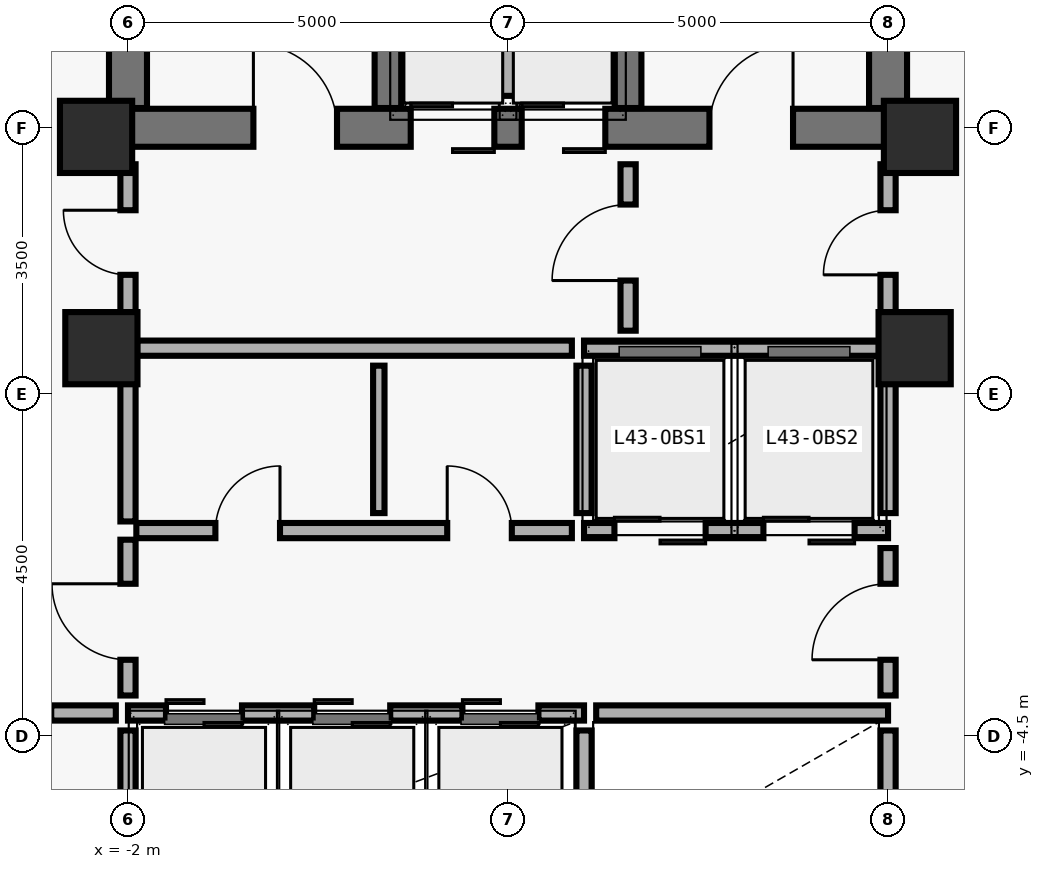
"""IFC4 building model, lengths in metres.
Left out: names, types, materials, properties, quantities, classifications, styles, units other than length and angle.
Written with IfcOpenShell. Run it as: python <this file> out.ifc"""

import sys

from ifc_helpers import new_model, si_unit, direction, frame, frame_2d, origin, origin_2d, place, context, subcontext, project, spatial, rectangle, extrude, element, fill, save


model = new_model("IFC4")
c1 = context("Model", 3, precision=1e-05, world=origin(), true_north=direction((0.0, 1.0)))
c2 = subcontext(c1, "Body", "Model", "MODEL_VIEW")
j1 = project(units=[si_unit("LENGTHUNIT", "METRE"), si_unit("PLANEANGLEUNIT", "RADIAN")], contexts=[c1])
p1 = place(None, origin())
s1 = spatial("IfcSite", under=j1, at=p1, CompositionType="ELEMENT")
p2 = place(p1, origin())
s2 = spatial("IfcBuilding", under=s1, at=p2, CompositionType="ELEMENT")
p3 = place(p2, frame((0.0, 0.0, 173.4)))
s3 = spatial("IfcBuildingStorey", under=s2, at=p3, CompositionType="ELEMENT", Elevation=173.4)
p4 = place(p3, frame((-2.0, 3.5, 0.0), z_axis=(0.0, 0.0, 1.0), x_axis=(1.0, 0.0, 0.0)))
e1 = element("IfcWall", 1, at=p4, inside=s3, PredefinedType="SHEAR", context=c2, shape_type="SweptSolid", body=[
    extrude(rectangle(XDim=10.0, YDim=0.5, at=frame_2d((5.0, 0.0))), origin(), (0.0, 0.0, 1.0), 5.392),
])
p5 = place(p4, frame((1.65, 0.0, 0.0)))
e2 = element("IfcOpeningElement", 2, at=p5, cuts=e1, PredefinedType="OPENING", context=c2, shape_type="SweptSolid", body=[
    extrude(rectangle(XDim=1.1, YDim=2.15, at=frame_2d((0.55, 1.075))), frame((0.0, 0.26, 0.0), z_axis=(0.0, -1.0, 0.0), x_axis=(1.0, 0.0, 0.0)), (0.0, 0.0, 1.0), 0.52),
])
p6 = place(p4, frame((7.65, 0.0, 0.0)))
e3 = element("IfcOpeningElement", 3, at=p6, cuts=e1, PredefinedType="OPENING", context=c2, shape_type="SweptSolid", body=[
    extrude(rectangle(XDim=1.1, YDim=2.15, at=frame_2d((0.55, 1.075))), frame((0.0, 0.26, 0.0), z_axis=(0.0, -1.0, 0.0), x_axis=(1.0, 0.0, 0.0)), (0.0, 0.0, 1.0), 0.52),
])
p7 = place(p4, frame((3.72, 0.0, 0.0)))
e4 = element("IfcOpeningElement", 4, at=p7, cuts=e1, PredefinedType="OPENING", context=c2, shape_type="SweptSolid", body=[
    extrude(rectangle(XDim=1.1, YDim=2.2, at=frame_2d((0.55, 1.1))), frame((0.0, 0.26, 0.0), z_axis=(0.0, -1.0, 0.0), x_axis=(1.0, 0.0, 0.0)), (0.0, 0.0, 1.0), 0.52),
])
p8 = place(p4, frame((5.18, 0.0, 0.0)))
e5 = element("IfcOpeningElement", 5, at=p8, cuts=e1, PredefinedType="OPENING", context=c2, shape_type="SweptSolid", body=[
    extrude(rectangle(XDim=1.1, YDim=2.2, at=frame_2d((0.55, 1.1))), frame((0.0, 0.26, 0.0), z_axis=(0.0, -1.0, 0.0), x_axis=(1.0, 0.0, 0.0)), (0.0, 0.0, 1.0), 0.52),
])
for number, where, z_axis, x_axis in (
    (6, (-2.0, 3.76, 0.0), (0.0, 0.0, 1.0), (0.0, 1.0, 0.0)),
    (7, (8.0, 3.76, 0.0), (0.0, 0.0, 1.0), (0.0, 1.0, 0.0)),
):
    element("IfcWall", number, at=place(p3, frame(where, z_axis=z_axis, x_axis=x_axis)), inside=s3, PredefinedType="SHEAR", context=c2, shape_type="SweptSolid", body=[
        extrude(rectangle(XDim=8.48, YDim=0.5, at=frame_2d((4.24, 0.0))), origin(), (0.0, 0.0, 1.0), 5.392),
    ])
for number, where, z_axis, x_axis in (
    (8, (1.42, 3.76, 0.0), (0.0, 0.0, 1.0), (0.0, 1.0, 0.0)),
    (9, (4.58, 3.76, 0.0), (0.0, 0.0, 1.0), (0.0, 1.0, 0.0)),
):
    element("IfcWall", number, at=place(p3, frame(where, z_axis=z_axis, x_axis=x_axis)), inside=s3, PredefinedType="SHEAR", context=c2, shape_type="SweptSolid", body=[
        extrude(rectangle(XDim=8.48, YDim=0.35, at=frame_2d((4.24, 0.0))), origin(), (0.0, 0.0, 1.0), 5.392),
    ])
for number, where, z_axis, x_axis in (
    (10, (-2.42, 3.38, 0.0), (0.0, 0.0, 1.0), (1.0, 0.0, 0.0)),
    (11, (8.42, 3.38, 0.0), (0.0, 0.0, 1.0), (1.0, 0.0, 0.0)),
    (12, (-2.35, 0.6, 0.0), (0.0, 0.0, 1.0), (1.0, 0.0, 0.0)),
    (13, (8.35, 0.6, 0.0), (0.0, 0.0, 1.0), (1.0, 0.0, 0.0)),
):
    element("IfcColumn", number, at=place(p3, frame(where, z_axis=z_axis, x_axis=x_axis)), inside=s3, PredefinedType="COLUMN", context=c2, shape_type="SweptSolid", body=[
        extrude(rectangle(XDim=0.95, YDim=0.95, at=origin_2d()), origin(), (0.0, 0.0, 1.0), 5.375),
    ])
p9 = place(p3, frame((3.0, 3.92, 0.0), z_axis=(0.0, 0.0, 1.0), x_axis=(0.0, 1.0, 0.0)))
e14 = element("IfcWall", 14, at=p9, inside=s3, PredefinedType="SOLIDWALL", context=c2, shape_type="SweptSolid", body=[
    extrude(rectangle(XDim=2.03, YDim=0.2, at=frame_2d((1.015, 0.0))), origin(), (0.0, 0.0, 1.0), 4.95),
])
p10 = place(p3, frame((4.0, 0.6, 0.0), z_axis=(0.0, 0.0, 1.0), x_axis=(1.0, 0.0, 0.0)))
e15 = element("IfcWall", 15, at=p10, inside=s3, PredefinedType="SOLIDWALL", context=c2, shape_type="SweptSolid", body=[
    extrude(rectangle(XDim=3.88, YDim=0.2, at=frame_2d((1.94, 0.0))), origin(), (0.0, 0.0, 1.0), 3.432),
])
p11 = place(p3, frame((4.0, -1.8, 0.0), z_axis=(0.0, 0.0, 1.0), x_axis=(1.0, 0.0, 0.0)))
e16 = element("IfcWall", 16, at=p11, inside=s3, PredefinedType="SOLIDWALL", context=c2, shape_type="SweptSolid", body=[
    extrude(rectangle(XDim=4.0, YDim=0.2, at=frame_2d((2.0, 0.0))), origin(), (0.0, 0.0, 1.0), 4.95),
])
p12 = place(p11, frame((0.4, 0.0, 0.0)))
e17 = element("IfcOpeningElement", 17, at=p12, cuts=e16, PredefinedType="OPENING", context=c2, shape_type="SweptSolid", body=[
    extrude(rectangle(XDim=1.2, YDim=2.25, at=frame_2d((0.6, 1.125))), frame((0.0, 0.11, 0.0), z_axis=(0.0, -1.0, 0.0), x_axis=(1.0, 0.0, 0.0)), (0.0, 0.0, 1.0), 0.22),
])
p13 = place(p11, frame((2.36, 0.0, 0.0)))
e18 = element("IfcOpeningElement", 18, at=p13, cuts=e16, PredefinedType="OPENING", context=c2, shape_type="SweptSolid", body=[
    extrude(rectangle(XDim=1.2, YDim=2.25, at=frame_2d((0.6, 1.125))), frame((0.0, 0.11, 0.0), z_axis=(0.0, -1.0, 0.0), x_axis=(1.0, 0.0, 0.0)), (0.0, 0.0, 1.0), 0.22),
])
p14 = place(p3, frame((4.0, -1.57, 0.0), z_axis=(0.0, 0.0, 1.0), x_axis=(0.0, 1.0, 0.0)))
e19 = element("IfcWall", 19, at=p14, inside=s3, PredefinedType="SOLIDWALL", context=c2, shape_type="SweptSolid", body=[
    extrude(rectangle(XDim=1.94, YDim=0.2, at=frame_2d((0.97, 0.0))), origin(), (0.0, 0.0, 1.0), 4.95),
])
p15 = place(p3, frame((8.0, -1.57, 0.0), z_axis=(0.0, 0.0, 1.0), x_axis=(0.0, 1.0, 0.0)))
e20 = element("IfcWall", 20, at=p15, inside=s3, PredefinedType="SOLIDWALL", context=c2, shape_type="SweptSolid", body=[
    extrude(rectangle(XDim=2.05, YDim=0.2, at=frame_2d((1.025, 0.0))), origin(), (0.0, 0.0, 1.0), 3.432),
])
p16 = place(p3, frame((-2.0, -4.2, 0.0), z_axis=(0.0, 0.0, 1.0), x_axis=(1.0, 0.0, 0.0)))
e21 = element("IfcWall", 21, at=p16, inside=s3, PredefinedType="SOLIDWALL", context=c2, shape_type="SweptSolid", body=[
    extrude(rectangle(XDim=6.0, YDim=0.2, at=frame_2d((3.0, 0.0))), origin(), (0.0, 0.0, 1.0), 4.95),
])
p17 = place(p16, frame((0.5, 0.0, 0.0)))
e22 = element("IfcOpeningElement", 22, at=p17, cuts=e21, PredefinedType="OPENING", context=c2, shape_type="SweptSolid", body=[
    extrude(rectangle(XDim=1.0, YDim=2.2, at=frame_2d((0.5, 1.1))), frame((0.0, 0.11, 0.0), z_axis=(0.0, -1.0, 0.0), x_axis=(1.0, 0.0, 0.0)), (0.0, 0.0, 1.0), 0.22),
])
p18 = place(p16, frame((2.45, 0.0, 0.0)))
e23 = element("IfcOpeningElement", 23, at=p18, cuts=e21, PredefinedType="OPENING", context=c2, shape_type="SweptSolid", body=[
    extrude(rectangle(XDim=1.0, YDim=2.2, at=frame_2d((0.5, 1.1))), frame((0.0, 0.11, 0.0), z_axis=(0.0, -1.0, 0.0), x_axis=(1.0, 0.0, 0.0)), (0.0, 0.0, 1.0), 0.22),
])
p19 = place(p16, frame((4.4, 0.0, 0.0)))
e24 = element("IfcOpeningElement", 24, at=p19, cuts=e21, PredefinedType="OPENING", context=c2, shape_type="SweptSolid", body=[
    extrude(rectangle(XDim=1.0, YDim=2.2, at=frame_2d((0.5, 1.1))), frame((0.0, 0.11, 0.0), z_axis=(0.0, -1.0, 0.0), x_axis=(1.0, 0.0, 0.0)), (0.0, 0.0, 1.0), 0.22),
])
p20 = place(p3, frame((-2.0, -6.37, 0.0), z_axis=(0.0, 0.0, 1.0), x_axis=(0.0, 1.0, 0.0)))
e25 = element("IfcWall", 25, at=p20, inside=s3, PredefinedType="SOLIDWALL", context=c2, shape_type="SweptSolid", body=[
    extrude(rectangle(XDim=1.94, YDim=0.2, at=frame_2d((0.97, 0.0))), origin(), (0.0, 0.0, 1.0), 3.432),
])
p21 = place(p3, frame((4.16, -4.2, 0.0), z_axis=(0.0, 0.0, 1.0), x_axis=(1.0, 0.0, 0.0)))
e26 = element("IfcWall", 26, at=p21, inside=s3, PredefinedType="SOLIDWALL", context=c2, shape_type="SweptSolid", body=[
    extrude(rectangle(XDim=3.84, YDim=0.2, at=frame_2d((1.92, 0.0))), origin(), (0.0, 0.0, 1.0), 4.95),
])
p22 = place(p3, frame((4.0, -6.37, 0.0), z_axis=(0.0, 0.0, 1.0), x_axis=(0.0, 1.0, 0.0)))
e27 = element("IfcWall", 27, at=p22, inside=s3, PredefinedType="SOLIDWALL", context=c2, shape_type="SweptSolid", body=[
    extrude(rectangle(XDim=1.94, YDim=0.2, at=frame_2d((0.97, 0.0))), origin(), (0.0, 0.0, 1.0), 4.95),
])
p23 = place(p3, frame((8.0, -6.37, 0.0), z_axis=(0.0, 0.0, 1.0), x_axis=(0.0, 1.0, 0.0)))
e28 = element("IfcWall", 28, at=p23, inside=s3, PredefinedType="SOLIDWALL", context=c2, shape_type="SweptSolid", body=[
    extrude(rectangle(XDim=1.94, YDim=0.2, at=frame_2d((0.97, 0.0))), origin(), (0.0, 0.0, 1.0), 3.432),
])
p24 = place(p3, frame((4.58, 0.83, 0.0), z_axis=(0.0, 0.0, 1.0), x_axis=(0.0, 1.0, 0.0)))
e29 = element("IfcWall", 29, at=p24, inside=s3, PredefinedType="MOVABLE", context=c2, shape_type="SweptSolid", body=[
    extrude(rectangle(XDim=2.19, YDim=0.2, at=frame_2d((1.095, 0.0))), origin(), (0.0, 0.0, 1.0), 4.95),
])
p25 = place(p24, frame((0.66, 0.0, 0.0)))
e30 = element("IfcOpeningElement", 30, at=p25, cuts=e29, PredefinedType="OPENING", context=c2, shape_type="SweptSolid", body=[
    extrude(rectangle(XDim=1.0, YDim=2.1, at=frame_2d((0.5, 1.05))), frame((0.0, 0.11, 0.0), z_axis=(0.0, -1.0, 0.0), x_axis=(1.0, 0.0, 0.0)), (0.0, 0.0, 1.0), 0.22),
])
p26 = place(p3, frame((-2.0, 0.72, 0.0), z_axis=(0.0, 0.0, 1.0), x_axis=(0.0, 1.0, 0.0)))
e31 = element("IfcWall", 31, at=p26, inside=s3, PredefinedType="MOVABLE", context=c2, shape_type="SweptSolid", body=[
    extrude(rectangle(XDim=2.3, YDim=0.2, at=frame_2d((1.15, 0.0))), origin(), (0.0, 0.0, 1.0), 3.432),
])
p27 = place(p26, frame((0.845, 0.0, 0.0)))
e32 = element("IfcOpeningElement", 32, at=p27, cuts=e31, PredefinedType="OPENING", context=c2, shape_type="SweptSolid", body=[
    extrude(rectangle(XDim=0.85, YDim=2.1, at=frame_2d((0.425, 1.05))), frame((0.0, 0.11, 0.0), z_axis=(0.0, -1.0, 0.0), x_axis=(1.0, 0.0, 0.0)), (0.0, 0.0, 1.0), 0.22),
])
p28 = place(p3, frame((8.0, 0.72, 0.0), z_axis=(0.0, 0.0, 1.0), x_axis=(0.0, 1.0, 0.0)))
e33 = element("IfcWall", 33, at=p28, inside=s3, PredefinedType="MOVABLE", context=c2, shape_type="SweptSolid", body=[
    extrude(rectangle(XDim=2.3, YDim=0.2, at=frame_2d((1.15, 0.0))), origin(), (0.0, 0.0, 1.0), 3.432),
])
p29 = place(p28, frame((0.845, 0.0, 0.0)))
e34 = element("IfcOpeningElement", 34, at=p29, cuts=e33, PredefinedType="OPENING", context=c2, shape_type="SweptSolid", body=[
    extrude(rectangle(XDim=0.85, YDim=2.1, at=frame_2d((0.425, 1.05))), frame((0.0, 0.11, 0.0), z_axis=(0.0, -1.0, 0.0), x_axis=(1.0, 0.0, 0.0)), (0.0, 0.0, 1.0), 0.22),
])
p30 = place(p3, frame((-2.0, -3.97, 0.0), z_axis=(0.0, 0.0, 1.0), x_axis=(0.0, 1.0, 0.0)))
e35 = element("IfcWall", 35, at=p30, inside=s3, PredefinedType="MOVABLE", context=c2, shape_type="SweptSolid", body=[
    extrude(rectangle(XDim=2.05, YDim=0.2, at=frame_2d((1.025, 0.0))), origin(), (0.0, 0.0, 1.0), 3.432),
])
p31 = place(p30, frame((0.47, 0.0, 0.0)))
e36 = element("IfcOpeningElement", 36, at=p31, cuts=e35, PredefinedType="OPENING", context=c2, shape_type="SweptSolid", body=[
    extrude(rectangle(XDim=1.0, YDim=2.1, at=frame_2d((0.5, 1.05))), frame((0.0, 0.11, 0.0), z_axis=(0.0, -1.0, 0.0), x_axis=(1.0, 0.0, 0.0)), (0.0, 0.0, 1.0), 0.22),
])
p32 = place(p3, frame((8.0, -3.97, 0.0), z_axis=(0.0, 0.0, 1.0), x_axis=(0.0, 1.0, 0.0)))
e37 = element("IfcWall", 37, at=p32, inside=s3, PredefinedType="MOVABLE", context=c2, shape_type="SweptSolid", body=[
    extrude(rectangle(XDim=1.94, YDim=0.2, at=frame_2d((0.97, 0.0))), origin(), (0.0, 0.0, 1.0), 3.432),
])
p33 = place(p32, frame((0.47, 0.0, 0.0)))
e38 = element("IfcOpeningElement", 38, at=p33, cuts=e37, PredefinedType="OPENING", context=c2, shape_type="SweptSolid", body=[
    extrude(rectangle(XDim=1.0, YDim=2.1, at=frame_2d((0.5, 1.05))), frame((0.0, 0.11, 0.0), z_axis=(0.0, -1.0, 0.0), x_axis=(1.0, 0.0, 0.0)), (0.0, 0.0, 1.0), 0.22),
])
p34 = place(p3, frame((-1.89, -1.8, 0.0), z_axis=(0.0, 0.0, 1.0), x_axis=(1.0, 0.0, 0.0)))
e39 = element("IfcWall", 39, at=p34, inside=s3, PredefinedType="MOVABLE", context=c2, shape_type="SweptSolid", body=[
    extrude(rectangle(XDim=5.73, YDim=0.2, at=frame_2d((2.865, 0.0))), origin(), (0.0, 0.0, 1.0), 4.95),
])
p35 = place(p34, frame((1.04, 0.0, 0.0)))
e40 = element("IfcOpeningElement", 40, at=p35, cuts=e39, PredefinedType="OPENING", context=c2, shape_type="SweptSolid", body=[
    extrude(rectangle(XDim=0.85, YDim=2.1, at=frame_2d((0.425, 1.05))), frame((0.0, 0.11, 0.0), z_axis=(0.0, -1.0, 0.0), x_axis=(1.0, 0.0, 0.0)), (0.0, 0.0, 1.0), 0.22),
])
p36 = place(p34, frame((4.09, 0.0, 0.0)))
e41 = element("IfcOpeningElement", 41, at=p36, cuts=e39, PredefinedType="OPENING", context=c2, shape_type="SweptSolid", body=[
    extrude(rectangle(XDim=0.85, YDim=2.1, at=frame_2d((0.425, 1.05))), frame((0.0, 0.11, 0.0), z_axis=(0.0, -1.0, 0.0), x_axis=(1.0, 0.0, 0.0)), (0.0, 0.0, 1.0), 0.22),
])
p37 = place(p3, frame((-2.16, -4.2, 0.0), z_axis=(0.0, 0.0, 1.0), x_axis=(-1.0, 0.0, 0.0)))
e42 = element("IfcWall", 42, at=p37, inside=s3, PredefinedType="MOVABLE", context=c2, shape_type="SweptSolid", body=[
    extrude(rectangle(XDim=2.5, YDim=0.2, at=frame_2d((1.25, 0.0))), origin(), (0.0, 0.0, 1.0), 4.95),
])
p38 = place(p37, frame((0.85, 0.0, 0.0)))
e43 = element("IfcOpeningElement", 43, at=p38, cuts=e42, PredefinedType="OPENING", context=c2, shape_type="SweptSolid", body=[
    extrude(rectangle(XDim=1.1, YDim=2.1, at=frame_2d((0.55, 1.05))), frame((0.0, 0.11, 0.0), z_axis=(0.0, -1.0, 0.0), x_axis=(1.0, 0.0, 0.0)), (0.0, 0.0, 1.0), 0.22),
])
p39 = place(p3, frame((-1.88, 0.6, 0.0), z_axis=(0.0, 0.0, 1.0), x_axis=(1.0, 0.0, 0.0)))
e44 = element("IfcWall", 44, at=p39, inside=s3, PredefinedType="MOVABLE", context=c2, shape_type="SweptSolid", body=[
    extrude(rectangle(XDim=5.72, YDim=0.2, at=frame_2d((2.86, 0.0))), origin(), (0.0, 0.0, 1.0), 3.432),
])
p40 = place(p3, frame((1.3, -1.57, 0.0), z_axis=(0.0, 0.0, 1.0), x_axis=(0.0, 1.0, 0.0)))
e45 = element("IfcWall", 45, at=p40, inside=s3, PredefinedType="PARTITIONING", context=c2, shape_type="SweptSolid", body=[
    extrude(rectangle(XDim=1.94, YDim=0.15, at=frame_2d((0.97, 0.0))), origin(), (0.0, 0.0, 1.0), 4.95),
])
p41 = place(p3, frame((-2.0, -1.68, 0.0), z_axis=(0.0, 0.0, 1.0), x_axis=(0.0, 1.0, 0.0)))
e46 = element("IfcWall", 46, at=p41, inside=s3, PredefinedType="MOVABLE", context=c2, shape_type="SweptSolid", body=[
    extrude(rectangle(XDim=2.16, YDim=0.2, at=frame_2d((1.08, 0.0))), origin(), (0.0, 0.0, 1.0), 3.432),
])
p42 = place(p5, origin())
e47 = element("IfcDoor", 47, at=p42, inside=s3, OperationType="SINGLE_SWING_LEFT", PredefinedType="DOOR", context=c2, shape_type="SweptSolid", body=[
    extrude(rectangle(XDim=1.1, YDim=2.15, at=frame_2d((0.55, 1.075))), frame((0.0, 0.025, 0.0), z_axis=(0.0, -1.0, 0.0), x_axis=(1.0, 0.0, 0.0)), (0.0, 0.0, 1.0), 0.05),
])
fill(e2, e47)
p43 = place(p6, origin())
e48 = element("IfcDoor", 48, at=p43, inside=s3, OperationType="SINGLE_SWING_RIGHT", PredefinedType="DOOR", context=c2, shape_type="SweptSolid", body=[
    extrude(rectangle(XDim=1.1, YDim=2.15, at=frame_2d((0.55, 1.075))), frame((0.0, 0.025, 0.0), z_axis=(0.0, -1.0, 0.0), x_axis=(1.0, 0.0, 0.0)), (0.0, 0.0, 1.0), 0.05),
])
fill(e3, e48)
p44 = place(p7, origin())
e49 = element("IfcDoor", 49, at=p44, inside=s3, OperationType="DOUBLE_DOOR_SLIDING", PredefinedType="DOOR", context=c2, shape_type="SweptSolid", body=[
    extrude(rectangle(XDim=1.1, YDim=2.2, at=frame_2d((0.55, 1.1))), frame((0.0, 0.025, 0.0), z_axis=(0.0, -1.0, 0.0), x_axis=(1.0, 0.0, 0.0)), (0.0, 0.0, 1.0), 0.05),
])
fill(e4, e49)
p45 = place(p8, origin())
e50 = element("IfcDoor", 50, at=p45, inside=s3, OperationType="DOUBLE_DOOR_SLIDING", PredefinedType="DOOR", context=c2, shape_type="SweptSolid", body=[
    extrude(rectangle(XDim=1.1, YDim=2.2, at=frame_2d((0.55, 1.1))), frame((0.0, 0.025, 0.0), z_axis=(0.0, -1.0, 0.0), x_axis=(1.0, 0.0, 0.0)), (0.0, 0.0, 1.0), 0.05),
])
fill(e5, e50)
p46 = place(p25, origin())
e51 = element("IfcDoor", 51, at=p46, inside=s3, OperationType="SINGLE_SWING_LEFT", PredefinedType="DOOR", context=c2, shape_type="SweptSolid", body=[
    extrude(rectangle(XDim=1.0, YDim=2.1, at=frame_2d((0.5, 1.05))), frame((0.0, 0.025, 0.0), z_axis=(0.0, -1.0, 0.0), x_axis=(1.0, 0.0, 0.0)), (0.0, 0.0, 1.0), 0.05),
])
fill(e30, e51)
p47 = place(p27, origin())
e52 = element("IfcDoor", 52, at=p47, inside=s3, OperationType="SINGLE_SWING_RIGHT", PredefinedType="DOOR", context=c2, shape_type="SweptSolid", body=[
    extrude(rectangle(XDim=0.85, YDim=2.1, at=frame_2d((0.425, 1.05))), frame((0.0, 0.025, 0.0), z_axis=(0.0, -1.0, 0.0), x_axis=(1.0, 0.0, 0.0)), (0.0, 0.0, 1.0), 0.05),
])
fill(e32, e52)
p48 = place(p29, origin())
e53 = element("IfcDoor", 53, at=p48, inside=s3, OperationType="SINGLE_SWING_LEFT", PredefinedType="DOOR", context=c2, shape_type="SweptSolid", body=[
    extrude(rectangle(XDim=0.85, YDim=2.1, at=frame_2d((0.425, 1.05))), frame((0.0, 0.025, 0.0), z_axis=(0.0, -1.0, 0.0), x_axis=(1.0, 0.0, 0.0)), (0.0, 0.0, 1.0), 0.05),
])
fill(e34, e53)
p49 = place(p31, origin())
e54 = element("IfcDoor", 54, at=p49, inside=s3, OperationType="SINGLE_SWING_RIGHT", PredefinedType="DOOR", context=c2, shape_type="SweptSolid", body=[
    extrude(rectangle(XDim=1.0, YDim=2.1, at=frame_2d((0.5, 1.05))), frame((0.0, 0.025, 0.0), z_axis=(0.0, -1.0, 0.0), x_axis=(1.0, 0.0, 0.0)), (0.0, 0.0, 1.0), 0.05),
])
fill(e36, e54)
p50 = place(p33, origin())
e55 = element("IfcDoor", 55, at=p50, inside=s3, OperationType="SINGLE_SWING_LEFT", PredefinedType="DOOR", context=c2, shape_type="SweptSolid", body=[
    extrude(rectangle(XDim=1.0, YDim=2.1, at=frame_2d((0.5, 1.05))), frame((0.0, 0.025, 0.0), z_axis=(0.0, -1.0, 0.0), x_axis=(1.0, 0.0, 0.0)), (0.0, 0.0, 1.0), 0.05),
])
fill(e38, e55)
p51 = place(p35, origin())
e56 = element("IfcDoor", 56, at=p51, inside=s3, OperationType="SINGLE_SWING_RIGHT", PredefinedType="DOOR", context=c2, shape_type="SweptSolid", body=[
    extrude(rectangle(XDim=0.85, YDim=2.1, at=frame_2d((0.425, 1.05))), frame((0.0, 0.025, 0.0), z_axis=(0.0, -1.0, 0.0), x_axis=(1.0, 0.0, 0.0)), (0.0, 0.0, 1.0), 0.05),
])
fill(e40, e56)
p52 = place(p36, origin())
e57 = element("IfcDoor", 57, at=p52, inside=s3, OperationType="SINGLE_SWING_LEFT", PredefinedType="DOOR", context=c2, shape_type="SweptSolid", body=[
    extrude(rectangle(XDim=0.85, YDim=2.1, at=frame_2d((0.425, 1.05))), frame((0.0, 0.025, 0.0), z_axis=(0.0, -1.0, 0.0), x_axis=(1.0, 0.0, 0.0)), (0.0, 0.0, 1.0), 0.05),
])
fill(e41, e57)
p53 = place(p12, origin())
e58 = element("IfcDoor", 58, at=p53, inside=s3, OperationType="DOUBLE_DOOR_SLIDING", PredefinedType="DOOR", context=c2, shape_type="SweptSolid", body=[
    extrude(rectangle(XDim=1.2, YDim=2.25, at=frame_2d((0.6, 1.125))), frame((0.0, 0.025, 0.0), z_axis=(0.0, -1.0, 0.0), x_axis=(1.0, 0.0, 0.0)), (0.0, 0.0, 1.0), 0.05),
])
fill(e17, e58)
p54 = place(p13, origin())
e59 = element("IfcDoor", 59, at=p54, inside=s3, OperationType="DOUBLE_DOOR_SLIDING", PredefinedType="DOOR", context=c2, shape_type="SweptSolid", body=[
    extrude(rectangle(XDim=1.2, YDim=2.25, at=frame_2d((0.6, 1.125))), frame((0.0, 0.025, 0.0), z_axis=(0.0, -1.0, 0.0), x_axis=(1.0, 0.0, 0.0)), (0.0, 0.0, 1.0), 0.05),
])
fill(e18, e59)
p55 = place(p17, origin())
e60 = element("IfcDoor", 60, at=p55, inside=s3, OperationType="DOUBLE_DOOR_SLIDING", PredefinedType="DOOR", context=c2, shape_type="SweptSolid", body=[
    extrude(rectangle(XDim=1.0, YDim=2.2, at=frame_2d((0.5, 1.1))), frame((0.0, 0.025, 0.0), z_axis=(0.0, -1.0, 0.0), x_axis=(1.0, 0.0, 0.0)), (0.0, 0.0, 1.0), 0.05),
])
fill(e22, e60)
p56 = place(p18, origin())
e61 = element("IfcDoor", 61, at=p56, inside=s3, OperationType="DOUBLE_DOOR_SLIDING", PredefinedType="DOOR", context=c2, shape_type="SweptSolid", body=[
    extrude(rectangle(XDim=1.0, YDim=2.2, at=frame_2d((0.5, 1.1))), frame((0.0, 0.025, 0.0), z_axis=(0.0, -1.0, 0.0), x_axis=(1.0, 0.0, 0.0)), (0.0, 0.0, 1.0), 0.05),
])
fill(e23, e61)
p57 = place(p19, origin())
e62 = element("IfcDoor", 62, at=p57, inside=s3, OperationType="DOUBLE_DOOR_SLIDING", PredefinedType="DOOR", context=c2, shape_type="SweptSolid", body=[
    extrude(rectangle(XDim=1.0, YDim=2.2, at=frame_2d((0.5, 1.1))), frame((0.0, 0.025, 0.0), z_axis=(0.0, -1.0, 0.0), x_axis=(1.0, 0.0, 0.0)), (0.0, 0.0, 1.0), 0.05),
])
fill(e24, e62)
save(model, sys.argv[1])
